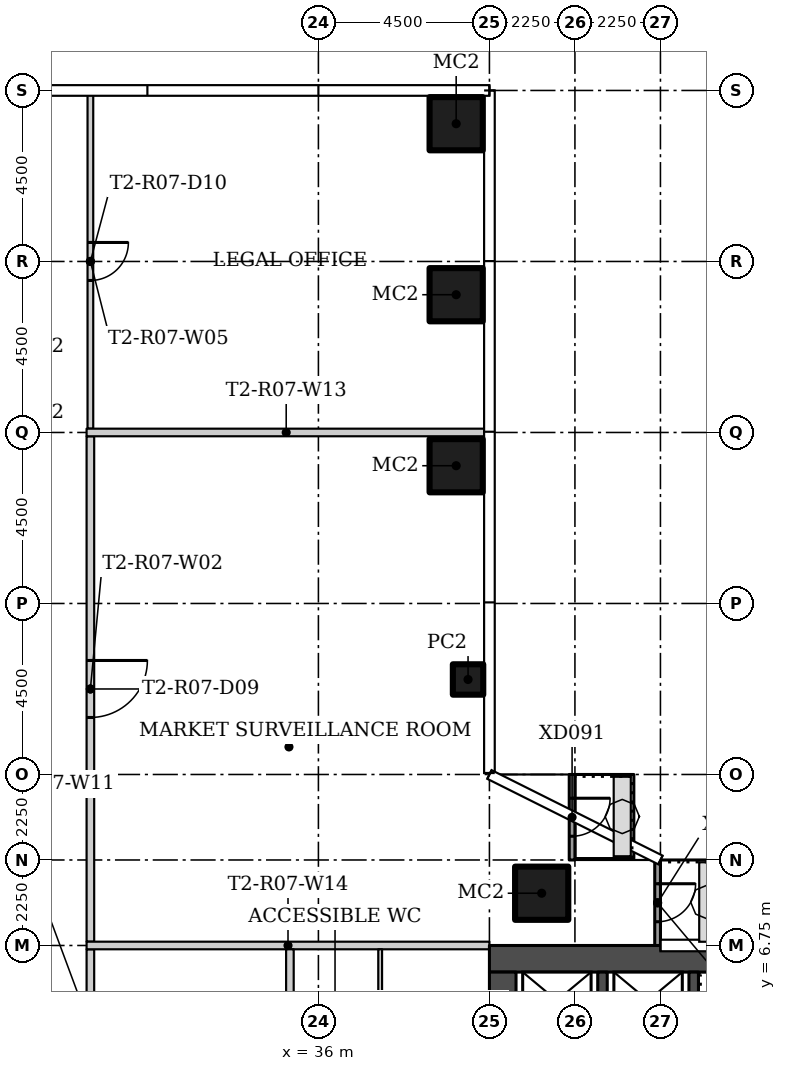
"""IFC4 building model, lengths in metres.
Left out: names, types, materials, properties, quantities, classifications, styles, units other than length and angle.
Written with IfcOpenShell. Run it as: python <this file> out.ifc"""

import sys

from ifc_helpers import new_model, si_unit, direction, frame, frame_2d, origin, origin_2d, place, context, subcontext, project, spatial, rectangle, hollow_rectangle, extrude, element, fill, save


model = new_model("IFC4")
c1 = context("Model", 3, precision=1e-05, world=origin(), true_north=direction((0.0, 1.0)))
c2 = subcontext(c1, "Body", "Model", "MODEL_VIEW")
j1 = project(units=[si_unit("LENGTHUNIT", "METRE"), si_unit("PLANEANGLEUNIT", "RADIAN")], contexts=[c1])
p1 = place(None, origin())
s1 = spatial("IfcSite", under=j1, at=p1, CompositionType="ELEMENT")
p2 = place(p1, origin())
s2 = spatial("IfcBuilding", under=s1, at=p2, CompositionType="ELEMENT")
p3 = place(p2, frame((0.0, 0.0, 69.3)))
s3 = spatial("IfcBuildingStorey", under=s2, at=p3, CompositionType="ELEMENT", Elevation=69.3)
p4 = place(p3, frame((41.875, 8.125, 0.0)))
e1 = element("IfcColumn", 1, at=p4, inside=s3, PredefinedType="COLUMN", context=c2, shape_type="SweptSolid", body=[
    extrude(hollow_rectangle(XDim=1.4, YDim=1.4, WallThickness=0.05, at=origin_2d()), origin(), (0.0, 0.0, 1.0), 3.55),
])
p5 = place(p3, frame((39.938, 13.75, 0.0)))
e2 = element("IfcColumn", 2, at=p5, inside=s3, PredefinedType="COLUMN", context=c2, shape_type="SweptSolid", body=[
    extrude(hollow_rectangle(XDim=0.8, YDim=0.8, WallThickness=0.025, at=origin_2d()), origin(), (0.0, 0.0, 1.0), 3.55),
])
for number, where in (
    (3, (39.625, 19.375, 0.0)),
    (4, (39.625, 23.875, 0.0)),
    (5, (39.625, 28.375, 0.0)),
):
    element("IfcColumn", number, at=place(p3, frame(where)), inside=s3, PredefinedType="COLUMN", context=c2, shape_type="SweptSolid", body=[
        extrude(hollow_rectangle(XDim=1.4, YDim=1.4, WallThickness=0.05, at=origin_2d()), origin(), (0.0, 0.0, 1.0), 3.55),
    ])
p6 = place(p3, frame((30.0, 20.15, 0.0), z_axis=(0.0, 0.0, 1.0), x_axis=(0.0, -1.0, 0.0)))
e6 = element("IfcWall", 6, at=p6, inside=s3, PredefinedType="PARTITIONING", context=c2, shape_type="SweptSolid", body=[
    extrude(rectangle(XDim=13.3, YDim=0.2, at=frame_2d((6.65, 0.0))), origin(), (0.0, 0.0, 1.0), 3.55),
])
p7 = place(p6, frame((5.9, 0.0, 0.0)))
e7 = element("IfcOpeningElement", 7, at=p7, cuts=e6, PredefinedType="OPENING", context=c2, shape_type="SweptSolid", body=[
    extrude(rectangle(XDim=1.5, YDim=2.1, at=frame_2d((0.75, 1.05))), frame((0.0, 0.11, 0.0), z_axis=(0.0, -1.0, 0.0), x_axis=(1.0, 0.0, 0.0)), (0.0, 0.0, 1.0), 0.22),
])
p8 = place(p3, frame((30.0, 29.155, 0.0), z_axis=(0.0, 0.0, 1.0), x_axis=(0.0, -1.0, 0.0)))
e8 = element("IfcWall", 8, at=p8, inside=s3, PredefinedType="PARTITIONING", context=c2, shape_type="SweptSolid", body=[
    extrude(rectangle(XDim=8.805, YDim=0.15, at=frame_2d((4.402, 0.0))), origin(), (0.0, 0.0, 1.0), 3.55),
])
p9 = place(p8, frame((3.905, 0.0, 0.0)))
e9 = element("IfcOpeningElement", 9, at=p9, cuts=e8, PredefinedType="OPENING", context=c2, shape_type="SweptSolid", body=[
    extrude(rectangle(XDim=1.0, YDim=2.4, at=frame_2d((0.5, 1.2))), frame((0.0, 0.085, 0.0), z_axis=(0.0, -1.0, 0.0), x_axis=(1.0, 0.0, 0.0)), (0.0, 0.0, 1.0), 0.17),
])
p10 = place(p3, frame((30.0, 6.65, 0.0), z_axis=(0.0, 0.0, 1.0), x_axis=(0.0, -1.0, 0.0)))
e10 = element("IfcWall", 10, at=p10, inside=s3, PredefinedType="PARTITIONING", context=c2, shape_type="SweptSolid", body=[
    extrude(rectangle(XDim=4.1, YDim=0.2, at=frame_2d((2.05, 0.0))), origin(), (0.0, 0.0, 1.0), 3.55),
])
p11 = place(p3, frame((40.405, 20.25, 0.0), z_axis=(0.0, 0.0, 1.0), x_axis=(-1.0, 0.0, 0.0)))
e11 = element("IfcWall", 11, at=p11, inside=s3, PredefinedType="PARTITIONING", context=c2, shape_type="SweptSolid", body=[
    extrude(rectangle(XDim=10.505, YDim=0.2, at=frame_2d((5.252, 0.0))), origin(), (0.0, 0.0, 1.0), 3.55),
])
p12 = place(p3, frame((29.9, 6.75, 0.0)))
e12 = element("IfcWall", 12, at=p12, inside=s3, PredefinedType="PARTITIONING", context=c2, shape_type="SweptSolid", body=[
    extrude(rectangle(XDim=10.6, YDim=0.2, at=frame_2d((5.3, 0.0))), origin(), (0.0, 0.0, 1.0), 3.55),
])
p13 = place(p3, frame((37.625, 6.65, 0.0), z_axis=(0.0, 0.0, 1.0), x_axis=(0.0, -1.0, 0.0)))
e13 = element("IfcWall", 13, at=p13, inside=s3, PredefinedType="PARTITIONING", context=c2, shape_type="SweptSolid", body=[
    extrude(rectangle(XDim=4.15, YDim=0.1, at=frame_2d((2.075, 0.0))), origin(), (0.0, 0.0, 1.0), 3.55),
])
p14 = place(p3, frame((35.25, 6.65, 0.0), z_axis=(0.0, 0.0, 1.0), x_axis=(0.0, -1.0, 0.0)))
e14 = element("IfcWall", 14, at=p14, inside=s3, PredefinedType="PARTITIONING", context=c2, shape_type="SweptSolid", body=[
    extrude(rectangle(XDim=4.1, YDim=0.2, at=frame_2d((2.05, 0.0))), origin(), (0.0, 0.0, 1.0), 3.55),
])
p15 = place(p3, frame((42.675, 11.25, 0.0), z_axis=(0.0, 0.0, 1.0), x_axis=(0.0, -1.0, 0.0)))
e15 = element("IfcWall", 15, at=p15, inside=s3, PredefinedType="SOLIDWALL", context=c2, shape_type="SweptSolid", body=[
    extrude(rectangle(XDim=2.25, YDim=0.15, at=frame_2d((1.125, 0.0))), origin(), (0.0, 0.0, 1.0), 3.45),
])
p16 = place(p15, frame((0.625, 0.0, 0.0)))
e16 = element("IfcOpeningElement", 16, at=p16, cuts=e15, PredefinedType="OPENING", context=c2, shape_type="SweptSolid", body=[
    extrude(rectangle(XDim=1.0, YDim=2.4, at=frame_2d((0.5, 1.2))), frame((0.0, 0.085, 0.0), z_axis=(0.0, -1.0, 0.0), x_axis=(1.0, 0.0, 0.0)), (0.0, 0.0, 1.0), 0.17),
])
p17 = place(p3, frame((44.925, 9.0, 0.0), z_axis=(0.0, 0.0, 1.0), x_axis=(0.0, -1.0, 0.0)))
e17 = element("IfcWall", 17, at=p17, inside=s3, PredefinedType="SOLIDWALL", context=c2, shape_type="SweptSolid", body=[
    extrude(rectangle(XDim=2.257, YDim=0.15, at=frame_2d((1.128, 0.0))), origin(), (0.0, 0.0, 1.0), 3.45),
])
p18 = place(p17, frame((0.625, 0.0, 0.0)))
e18 = element("IfcOpeningElement", 18, at=p18, cuts=e17, PredefinedType="OPENING", context=c2, shape_type="SweptSolid", body=[
    extrude(rectangle(XDim=1.0, YDim=2.4, at=frame_2d((0.5, 1.2))), frame((0.0, 0.085, 0.0), z_axis=(0.0, -1.0, 0.0), x_axis=(1.0, 0.0, 0.0)), (0.0, 0.0, 1.0), 0.17),
])
p19 = place(p3, frame((54.0, 6.4, 0.0), z_axis=(0.0, 0.0, 1.0), x_axis=(-1.0, 0.0, 0.0)))
e19 = element("IfcWall", 19, at=p19, inside=s3, PredefinedType="SHEAR", context=c2, shape_type="SweptSolid", body=[
    extrude(rectangle(XDim=13.5, YDim=0.7, at=frame_2d((6.75, 0.0))), origin(), (0.0, 0.0, 1.0), 3.55),
])
p20 = place(p3, frame((40.85, -6.05, 0.0), z_axis=(0.0, 0.0, 1.0), x_axis=(0.0, 1.0, 0.0)))
e20 = element("IfcWall", 20, at=p20, inside=s3, PredefinedType="SHEAR", context=c2, shape_type="SweptSolid", body=[
    extrude(rectangle(XDim=12.1, YDim=0.7, at=frame_2d((6.05, 0.0))), origin(), (0.0, 0.0, 1.0), 3.55),
])
p21 = place(p20, frame((0.8, 0.0, 0.0)))
e21 = element("IfcOpeningElement", 21, at=p21, cuts=e20, PredefinedType="OPENING", context=c2, shape_type="SweptSolid", body=[
    extrude(rectangle(XDim=1.2, YDim=2.1, at=frame_2d((0.6, 1.05))), frame((0.0, 0.36, 0.0), z_axis=(0.0, -1.0, 0.0), x_axis=(1.0, 0.0, 0.0)), (0.0, 0.0, 1.0), 0.72),
])
p22 = place(p20, frame((6.4, 0.0, 0.0)))
e22 = element("IfcOpeningElement", 22, at=p22, cuts=e20, PredefinedType="OPENING", context=c2, shape_type="SweptSolid", body=[
    extrude(rectangle(XDim=1.8, YDim=2.4, at=frame_2d((0.9, 1.2))), frame((0.0, 0.36, 0.0), z_axis=(0.0, -1.0, 0.0), x_axis=(1.0, 0.0, 0.0)), (0.0, 0.0, 1.0), 0.72),
])
for number, where, z_axis, x_axis in (
    (23, (45.875, 3.25, 0.0), (0.0, 0.0, 1.0), (0.0, 1.0, 0.0)),
    (24, (43.475, 3.25, 0.0), (0.0, 0.0, 1.0), (0.0, 1.0, 0.0)),
):
    element("IfcWall", number, at=place(p3, frame(where, z_axis=z_axis, x_axis=x_axis)), inside=s3, PredefinedType="SHEAR", context=c2, shape_type="SweptSolid", body=[
        extrude(rectangle(XDim=2.8, YDim=0.25, at=frame_2d((1.4, 0.0))), origin(), (0.0, 0.0, 1.0), 3.55),
    ])
p23 = place(p7, origin())
e25 = element("IfcDoor", 25, at=p23, inside=s3, OperationType="DOUBLE_DOOR_SINGLE_SWING", PredefinedType="DOOR", context=c2, shape_type="SweptSolid", body=[
    extrude(rectangle(XDim=1.5, YDim=2.1, at=frame_2d((0.75, 1.05))), frame((0.0, 0.025, 0.0), z_axis=(0.0, -1.0, 0.0), x_axis=(1.0, 0.0, 0.0)), (0.0, 0.0, 1.0), 0.05),
])
fill(e7, e25)
p24 = place(p9, origin())
e26 = element("IfcDoor", 26, at=p24, inside=s3, OperationType="SINGLE_SWING_LEFT", PredefinedType="DOOR", context=c2, shape_type="SweptSolid", body=[
    extrude(rectangle(XDim=1.0, YDim=2.4, at=frame_2d((0.5, 1.2))), frame((0.0, 0.025, 0.0), z_axis=(0.0, -1.0, 0.0), x_axis=(1.0, 0.0, 0.0)), (0.0, 0.0, 1.0), 0.05),
])
fill(e9, e26)
p25 = place(p16, origin())
e27 = element("IfcDoor", 27, at=p25, inside=s3, OperationType="SINGLE_SWING_RIGHT", PredefinedType="DOOR", context=c2, shape_type="SweptSolid", body=[
    extrude(rectangle(XDim=1.0, YDim=2.4, at=frame_2d((0.5, 1.2))), frame((0.0, 0.025, 0.0), z_axis=(0.0, -1.0, 0.0), x_axis=(1.0, 0.0, 0.0)), (0.0, 0.0, 1.0), 0.05),
])
fill(e16, e27)
p26 = place(p18, origin())
e28 = element("IfcDoor", 28, at=p26, inside=s3, OperationType="SINGLE_SWING_LEFT", PredefinedType="DOOR", context=c2, shape_type="SweptSolid", body=[
    extrude(rectangle(XDim=1.0, YDim=2.4, at=frame_2d((0.5, 1.2))), frame((0.0, 0.025, 0.0), z_axis=(0.0, -1.0, 0.0), x_axis=(1.0, 0.0, 0.0)), (0.0, 0.0, 1.0), 0.05),
])
fill(e18, e28)
save(model, sys.argv[1])
